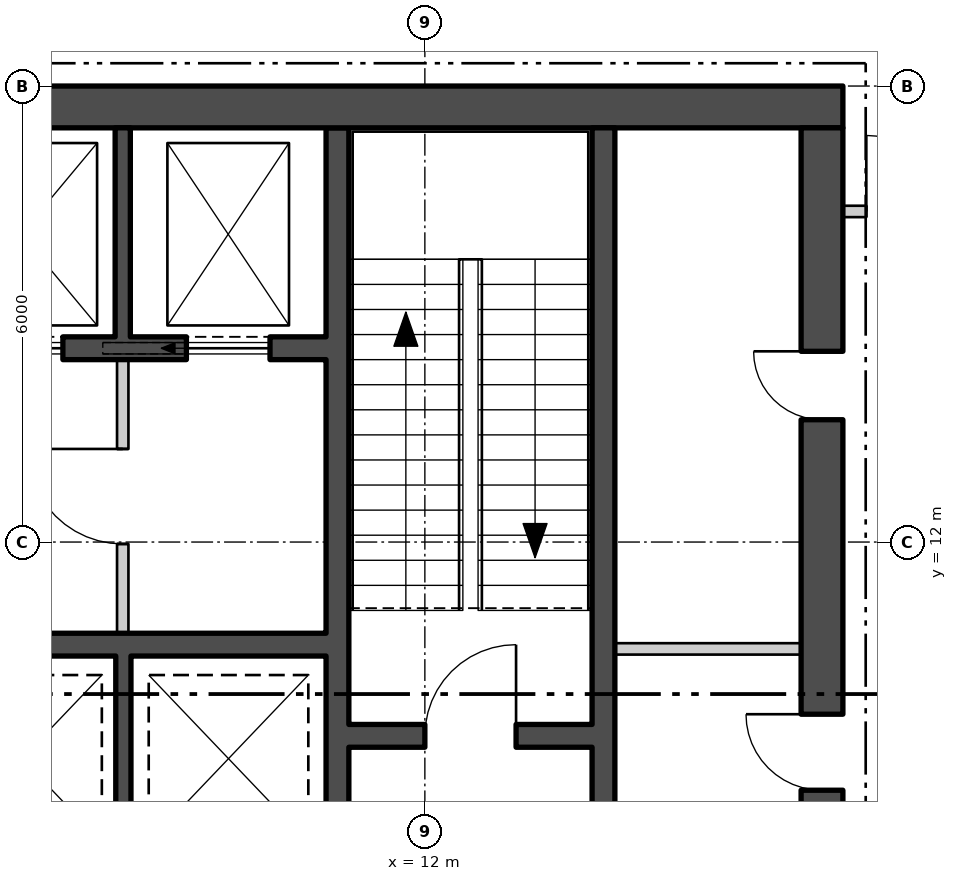
"""IFC4 building model, lengths in metres.
Left out: names, types, materials, properties, quantities, classifications, styles, units other than length and angle.
Written with IfcOpenShell. Run it as: python <this file> out.ifc"""

import sys

from ifc_helpers import new_model, si_unit, direction, frame, frame_2d, origin, place, context, subcontext, project, spatial, polyline, rectangle, outline, extrude, element, fill, save


model = new_model("IFC4")
c1 = context("Model", 3, precision=1e-05, world=origin(), true_north=direction((0.0, 1.0)))
c2 = subcontext(c1, "Body", "Model", "MODEL_VIEW")
j1 = project(units=[si_unit("LENGTHUNIT", "METRE"), si_unit("PLANEANGLEUNIT", "RADIAN")], contexts=[c1])
p1 = place(None, origin())
s1 = spatial("IfcSite", under=j1, at=p1, CompositionType="ELEMENT")
p2 = place(p1, origin())
s2 = spatial("IfcBuilding", under=s1, at=p2, CompositionType="ELEMENT")
p3 = place(p2, frame((0.0, 0.0, 84.3)))
s3 = spatial("IfcBuildingStorey", under=s2, at=p3, CompositionType="ELEMENT", Elevation=84.3)
p4 = place(p3, frame((5.085, -28.436, -0.18), z_axis=(0.0, 0.0, 1.0), x_axis=(0.499999194392, 0.866025868902, 0.0)))
e1 = element("IfcWall", 1, at=p4, inside=s3, PredefinedType="SOLIDWALL", context=c2, shape_type="SweptSolid", body=[
    extrude(outline(polyline([(-0.13, -0.225), (45.86, -0.225), (45.6, 0.225), (0.13, 0.225), (-0.13, -0.225)])), origin(), (0.0, 0.0, 1.0), 4.28),
])
p5 = place(p4, frame((1.424, 0.0, 1.08)))
e2 = element("IfcOpeningElement", 2, at=p5, cuts=e1, PredefinedType="OPENING", context=c2, shape_type="SweptSolid", body=[
    extrude(rectangle(XDim=2.4, YDim=2.6, at=frame_2d((1.2, 1.3))), frame((0.0, 0.235, 0.0), z_axis=(0.0, -1.0, 0.0), x_axis=(1.0, 0.0, 0.0)), (0.0, 0.0, 1.0), 0.47),
])
p6 = place(p4, frame((5.892, 0.0, 1.08)))
e3 = element("IfcOpeningElement", 3, at=p6, cuts=e1, PredefinedType="OPENING", context=c2, shape_type="SweptSolid", body=[
    extrude(rectangle(XDim=2.4, YDim=2.6, at=frame_2d((1.2, 1.3))), frame((0.0, 0.235, 0.0), z_axis=(0.0, -1.0, 0.0), x_axis=(1.0, 0.0, 0.0)), (0.0, 0.0, 1.0), 0.47),
])
p7 = place(p4, frame((10.399, 0.0, 1.08)))
e4 = element("IfcOpeningElement", 4, at=p7, cuts=e1, PredefinedType="OPENING", context=c2, shape_type="SweptSolid", body=[
    extrude(rectangle(XDim=2.4, YDim=2.6, at=frame_2d((1.2, 1.3))), frame((0.0, 0.235, 0.0), z_axis=(0.0, -1.0, 0.0), x_axis=(1.0, 0.0, 0.0)), (0.0, 0.0, 1.0), 0.47),
])
p8 = place(p4, frame((14.905, 0.0, 1.08)))
e5 = element("IfcOpeningElement", 5, at=p8, cuts=e1, PredefinedType="OPENING", context=c2, shape_type="SweptSolid", body=[
    extrude(rectangle(XDim=2.4, YDim=2.6, at=frame_2d((1.2, 1.3))), frame((0.0, 0.235, 0.0), z_axis=(0.0, -1.0, 0.0), x_axis=(1.0, 0.0, 0.0)), (0.0, 0.0, 1.0), 0.47),
])
p9 = place(p4, frame((19.412, 0.0, 1.08)))
e6 = element("IfcOpeningElement", 6, at=p9, cuts=e1, PredefinedType="OPENING", context=c2, shape_type="SweptSolid", body=[
    extrude(rectangle(XDim=2.4, YDim=2.6, at=frame_2d((1.2, 1.3))), frame((0.0, 0.235, 0.0), z_axis=(0.0, -1.0, 0.0), x_axis=(1.0, 0.0, 0.0)), (0.0, 0.0, 1.0), 0.47),
])
p10 = place(p4, frame((23.918, 0.0, 1.08)))
e7 = element("IfcOpeningElement", 7, at=p10, cuts=e1, PredefinedType="OPENING", context=c2, shape_type="SweptSolid", body=[
    extrude(rectangle(XDim=2.4, YDim=2.6, at=frame_2d((1.2, 1.3))), frame((0.0, 0.235, 0.0), z_axis=(0.0, -1.0, 0.0), x_axis=(1.0, 0.0, 0.0)), (0.0, 0.0, 1.0), 0.47),
])
p11 = place(p4, frame((28.425, 0.0, 1.08)))
e8 = element("IfcOpeningElement", 8, at=p11, cuts=e1, PredefinedType="OPENING", context=c2, shape_type="SweptSolid", body=[
    extrude(rectangle(XDim=2.4, YDim=2.6, at=frame_2d((1.2, 1.3))), frame((0.0, 0.235, 0.0), z_axis=(0.0, -1.0, 0.0), x_axis=(1.0, 0.0, 0.0)), (0.0, 0.0, 1.0), 0.47),
])
p12 = place(p4, frame((32.932, 0.0, 1.08)))
e9 = element("IfcOpeningElement", 9, at=p12, cuts=e1, PredefinedType="OPENING", context=c2, shape_type="SweptSolid", body=[
    extrude(rectangle(XDim=2.4, YDim=2.6, at=frame_2d((1.2, 1.3))), frame((0.0, 0.235, 0.0), z_axis=(0.0, -1.0, 0.0), x_axis=(1.0, 0.0, 0.0)), (0.0, 0.0, 1.0), 0.47),
])
p13 = place(p4, frame((37.438, 0.0, 1.08)))
e10 = element("IfcOpeningElement", 10, at=p13, cuts=e1, PredefinedType="OPENING", context=c2, shape_type="SweptSolid", body=[
    extrude(rectangle(XDim=2.4, YDim=2.6, at=frame_2d((1.2, 1.3))), frame((0.0, 0.235, 0.0), z_axis=(0.0, -1.0, 0.0), x_axis=(1.0, 0.0, 0.0)), (0.0, 0.0, 1.0), 0.47),
])
p14 = place(p4, frame((41.907, 0.0, 1.08)))
e11 = element("IfcOpeningElement", 11, at=p14, cuts=e1, PredefinedType="OPENING", context=c2, shape_type="SweptSolid", body=[
    extrude(rectangle(XDim=2.4, YDim=2.6, at=frame_2d((1.2, 1.3))), frame((0.0, 0.235, 0.0), z_axis=(0.0, -1.0, 0.0), x_axis=(1.0, 0.0, 0.0)), (0.0, 0.0, 1.0), 0.47),
])
p15 = place(p3, frame((-17.5, 17.725, 0.0), z_axis=(0.0, 0.0, 1.0), x_axis=(1.0, 0.0, 0.0)))
e12 = element("IfcWall", 12, at=p15, inside=s3, PredefinedType="SHEAR", context=c2, shape_type="SweptSolid", body=[
    extrude(rectangle(XDim=35.0, YDim=0.55, at=frame_2d((17.5, 0.0))), origin(), (0.0, 0.0, 1.0), 4.3),
])
p16 = place(p3, frame((17.225, 0.55, 0.0), z_axis=(0.0, 0.0, 1.0), x_axis=(0.0, 1.0, 0.0)))
e13 = element("IfcWall", 13, at=p16, inside=s3, PredefinedType="SHEAR", context=c2, shape_type="SweptSolid", body=[
    extrude(rectangle(XDim=16.9, YDim=0.55, at=frame_2d((8.45, 0.0))), origin(), (0.0, 0.0, 1.0), 4.3),
])
p17 = place(p16, frame((5.75, 0.0, 0.0)))
e14 = element("IfcOpeningElement", 14, at=p17, cuts=e13, PredefinedType="OPENING", context=c2, shape_type="SweptSolid", body=[
    extrude(rectangle(XDim=1.5, YDim=2.1, at=frame_2d((0.75, 1.05))), frame((0.0, 0.285, 0.0), z_axis=(0.0, -1.0, 0.0), x_axis=(1.0, 0.0, 0.0)), (0.0, 0.0, 1.0), 0.57),
])
p18 = place(p16, frame((1.525, 0.0, 0.0)))
e15 = element("IfcOpeningElement", 15, at=p18, cuts=e13, PredefinedType="OPENING", context=c2, shape_type="SweptSolid", body=[
    extrude(rectangle(XDim=0.9, YDim=2.1, at=frame_2d((0.45, 1.05))), frame((0.0, 0.285, 0.0), z_axis=(0.0, -1.0, 0.0), x_axis=(1.0, 0.0, 0.0)), (0.0, 0.0, 1.0), 0.57),
])
p19 = place(p16, frame((4.4, 0.0, 0.0)))
e16 = element("IfcOpeningElement", 16, at=p19, cuts=e13, PredefinedType="OPENING", context=c2, shape_type="SweptSolid", body=[
    extrude(rectangle(XDim=0.9, YDim=2.1, at=frame_2d((0.45, 1.05))), frame((0.0, 0.285, 0.0), z_axis=(0.0, -1.0, 0.0), x_axis=(1.0, 0.0, 0.0)), (0.0, 0.0, 1.0), 0.57),
])
p20 = place(p16, frame((8.184, 0.0, 0.0)))
e17 = element("IfcOpeningElement", 17, at=p20, cuts=e13, PredefinedType="OPENING", context=c2, shape_type="SweptSolid", body=[
    extrude(rectangle(XDim=1.0, YDim=2.1, at=frame_2d((0.5, 1.05))), frame((0.0, 0.285, 0.0), z_axis=(0.0, -1.0, 0.0), x_axis=(1.0, 0.0, 0.0)), (0.0, 0.0, 1.0), 0.57),
])
p21 = place(p16, frame((13.059, 0.0, 0.0)))
e18 = element("IfcOpeningElement", 18, at=p21, cuts=e13, PredefinedType="OPENING", context=c2, shape_type="SweptSolid", body=[
    extrude(rectangle(XDim=0.9, YDim=2.1, at=frame_2d((0.45, 1.05))), frame((0.0, 0.285, 0.0), z_axis=(0.0, -1.0, 0.0), x_axis=(1.0, 0.0, 0.0)), (0.0, 0.0, 1.0), 0.57),
])
p22 = place(p3, frame((10.85, 0.55, 0.0), z_axis=(0.0, 0.0, 1.0), x_axis=(0.0, 1.0, 0.0)))
e19 = element("IfcWall", 19, at=p22, inside=s3, PredefinedType="SHEAR", context=c2, shape_type="SweptSolid", body=[
    extrude(rectangle(XDim=16.9, YDim=0.3, at=frame_2d((8.45, 0.0))), origin(), (0.0, 0.0, 1.0), 4.3),
])
p23 = place(p22, frame((5.125, 0.0, 0.0)))
e20 = element("IfcOpeningElement", 20, at=p23, cuts=e19, PredefinedType="OPENING", context=c2, shape_type="SweptSolid", body=[
    extrude(rectangle(XDim=1.25, YDim=2.1, at=frame_2d((0.625, 1.05))), frame((0.0, 0.16, 0.0), z_axis=(0.0, -1.0, 0.0), x_axis=(1.0, 0.0, 0.0)), (0.0, 0.0, 1.0), 0.32),
])
p24 = place(p22, frame((1.55, 0.0, 0.0)))
e21 = element("IfcOpeningElement", 21, at=p24, cuts=e19, PredefinedType="OPENING", context=c2, shape_type="SweptSolid", body=[
    extrude(rectangle(XDim=1.0, YDim=2.1, at=frame_2d((0.5, 1.05))), frame((0.0, 0.16, 0.0), z_axis=(0.0, -1.0, 0.0), x_axis=(1.0, 0.0, 0.0)), (0.0, 0.0, 1.0), 0.32),
])
p25 = place(p3, frame((14.35, 0.55, 0.0), z_axis=(0.0, 0.0, 1.0), x_axis=(0.0, 1.0, 0.0)))
e22 = element("IfcWall", 22, at=p25, inside=s3, PredefinedType="SHEAR", context=c2, shape_type="SweptSolid", body=[
    extrude(rectangle(XDim=16.9, YDim=0.3, at=frame_2d((8.45, 0.0))), origin(), (0.0, 0.0, 1.0), 4.3),
])
p26 = place(p25, frame((5.75, 0.0, 0.0)))
e23 = element("IfcOpeningElement", 23, at=p26, cuts=e22, PredefinedType="OPENING", context=c2, shape_type="SweptSolid", body=[
    extrude(rectangle(XDim=1.5, YDim=2.1, at=frame_2d((0.75, 1.05))), frame((0.0, 0.16, 0.0), z_axis=(0.0, -1.0, 0.0), x_axis=(1.0, 0.0, 0.0)), (0.0, 0.0, 1.0), 0.32),
])
p27 = place(p3, frame((11.0, 9.45, 0.0), z_axis=(0.0, 0.0, 1.0), x_axis=(1.0, 0.0, 0.0)))
e24 = element("IfcWall", 24, at=p27, inside=s3, PredefinedType="SHEAR", context=c2, shape_type="SweptSolid", body=[
    extrude(rectangle(XDim=3.2, YDim=0.3, at=frame_2d((1.6, 0.0))), origin(), (0.0, 0.0, 1.0), 4.3),
])
p28 = place(p27, frame((1.0, 0.0, 0.0)))
e25 = element("IfcOpeningElement", 25, at=p28, cuts=e24, PredefinedType="OPENING", context=c2, shape_type="SweptSolid", body=[
    extrude(rectangle(XDim=1.2, YDim=2.1, at=frame_2d((0.6, 1.05))), frame((0.0, 0.16, 0.0), z_axis=(0.0, -1.0, 0.0), x_axis=(1.0, 0.0, 0.0)), (0.0, 0.0, 1.0), 0.32),
])
p29 = place(p3, frame((-10.7, 14.55, 0.0), z_axis=(0.0, 0.0, 1.0), x_axis=(1.0, 0.0, 0.0)))
e26 = element("IfcWall", 26, at=p29, inside=s3, PredefinedType="SHEAR", context=c2, shape_type="SweptSolid", body=[
    extrude(rectangle(XDim=21.4, YDim=0.3, at=frame_2d((10.7, 0.0))), origin(), (0.0, 0.0, 1.0), 4.3),
])
p30 = place(p29, frame((0.738, 0.0, 0.0)))
e27 = element("IfcOpeningElement", 27, at=p30, cuts=e26, PredefinedType="OPENING", context=c2, shape_type="SweptSolid", body=[
    extrude(rectangle(XDim=1.1, YDim=2.1, at=frame_2d((0.55, 1.05))), frame((0.0, 0.16, 0.0), z_axis=(0.0, -1.0, 0.0), x_axis=(1.0, 0.0, 0.0)), (0.0, 0.0, 1.0), 0.32),
])
p31 = place(p29, frame((3.462, 0.0, 0.0)))
e28 = element("IfcOpeningElement", 28, at=p31, cuts=e26, PredefinedType="OPENING", context=c2, shape_type="SweptSolid", body=[
    extrude(rectangle(XDim=1.1, YDim=2.1, at=frame_2d((0.55, 1.05))), frame((0.0, 0.16, 0.0), z_axis=(0.0, -1.0, 0.0), x_axis=(1.0, 0.0, 0.0)), (0.0, 0.0, 1.0), 0.32),
])
p32 = place(p29, frame((6.138, 0.0, 0.0)))
e29 = element("IfcOpeningElement", 29, at=p32, cuts=e26, PredefinedType="OPENING", context=c2, shape_type="SweptSolid", body=[
    extrude(rectangle(XDim=1.1, YDim=2.1, at=frame_2d((0.55, 1.05))), frame((0.0, 0.16, 0.0), z_axis=(0.0, -1.0, 0.0), x_axis=(1.0, 0.0, 0.0)), (0.0, 0.0, 1.0), 0.32),
])
p33 = place(p29, frame((8.812, 0.0, 0.0)))
e30 = element("IfcOpeningElement", 30, at=p33, cuts=e26, PredefinedType="OPENING", context=c2, shape_type="SweptSolid", body=[
    extrude(rectangle(XDim=1.1, YDim=2.1, at=frame_2d((0.55, 1.05))), frame((0.0, 0.16, 0.0), z_axis=(0.0, -1.0, 0.0), x_axis=(1.0, 0.0, 0.0)), (0.0, 0.0, 1.0), 0.32),
])
p34 = place(p29, frame((14.162, 0.0, 0.0)))
e31 = element("IfcOpeningElement", 31, at=p34, cuts=e26, PredefinedType="OPENING", context=c2, shape_type="SweptSolid", body=[
    extrude(rectangle(XDim=1.1, YDim=2.1, at=frame_2d((0.55, 1.05))), frame((0.0, 0.16, 0.0), z_axis=(0.0, -1.0, 0.0), x_axis=(1.0, 0.0, 0.0)), (0.0, 0.0, 1.0), 0.32),
])
p35 = place(p29, frame((16.837, 0.0, 0.0)))
e32 = element("IfcOpeningElement", 32, at=p35, cuts=e26, PredefinedType="OPENING", context=c2, shape_type="SweptSolid", body=[
    extrude(rectangle(XDim=1.1, YDim=2.1, at=frame_2d((0.55, 1.05))), frame((0.0, 0.16, 0.0), z_axis=(0.0, -1.0, 0.0), x_axis=(1.0, 0.0, 0.0)), (0.0, 0.0, 1.0), 0.32),
])
p36 = place(p29, frame((19.562, 0.0, 0.0)))
e33 = element("IfcOpeningElement", 33, at=p36, cuts=e26, PredefinedType="OPENING", context=c2, shape_type="SweptSolid", body=[
    extrude(rectangle(XDim=1.1, YDim=2.1, at=frame_2d((0.55, 1.05))), frame((0.0, 0.16, 0.0), z_axis=(0.0, -1.0, 0.0), x_axis=(1.0, 0.0, 0.0)), (0.0, 0.0, 1.0), 0.32),
])
p37 = place(p3, frame((2.6, 10.65, 0.0), z_axis=(0.0, 0.0, 1.0), x_axis=(1.0, 0.0, 0.0)))
e34 = element("IfcWall", 34, at=p37, inside=s3, PredefinedType="SHEAR", context=c2, shape_type="SweptSolid", body=[
    extrude(rectangle(XDim=8.1, YDim=0.3, at=frame_2d((4.05, 0.0))), origin(), (0.0, 0.0, 1.0), 4.3),
])
p38 = place(p3, frame((8.025, 14.7, 0.0), z_axis=(0.0, 0.0, 1.0), x_axis=(0.0, 1.0, 0.0)))
e35 = element("IfcWall", 35, at=p38, inside=s3, PredefinedType="SHEAR", context=c2, shape_type="SweptSolid", body=[
    extrude(rectangle(XDim=2.75, YDim=0.2, at=frame_2d((1.375, 0.0))), origin(), (0.0, 0.0, 1.0), 4.3),
])
p39 = place(p3, frame((8.033, 7.8, 0.0), z_axis=(0.0, 0.0, 1.0), x_axis=(0.0, 1.0, 0.0)))
e36 = element("IfcWall", 36, at=p39, inside=s3, PredefinedType="SHEAR", context=c2, shape_type="SweptSolid", body=[
    extrude(rectangle(XDim=2.7, YDim=0.2, at=frame_2d((1.35, 0.0))), origin(), (0.0, 0.0, 1.0), 4.3),
])
p40 = place(p3, frame((8.025, 10.8, 0.0), z_axis=(0.0, 0.0, 1.0), x_axis=(0.0, 1.0, 0.0)))
e37 = element("IfcWall", 37, at=p40, inside=s3, PredefinedType="PARTITIONING", context=c2, shape_type="SweptSolid", body=[
    extrude(rectangle(XDim=3.6, YDim=0.15, at=frame_2d((1.8, 0.0))), origin(), (0.0, 0.0, 1.0), 4.3),
])
p41 = place(p40, frame((1.175, 0.0, 0.0)))
e38 = element("IfcOpeningElement", 38, at=p41, cuts=e37, PredefinedType="OPENING", context=c2, shape_type="SweptSolid", body=[
    extrude(rectangle(XDim=1.25, YDim=2.1, at=frame_2d((0.625, 1.05))), frame((0.0, 0.085, 0.0), z_axis=(0.0, -1.0, 0.0), x_axis=(1.0, 0.0, 0.0)), (0.0, 0.0, 1.0), 0.17),
])
p42 = place(p3, frame((14.5, 10.594, 0.0), z_axis=(0.0, 0.0, 1.0), x_axis=(1.0, 0.0, 0.0)))
e39 = element("IfcWall", 39, at=p42, inside=s3, PredefinedType="PARTITIONING", context=c2, shape_type="SweptSolid", body=[
    extrude(rectangle(XDim=2.45, YDim=0.15, at=frame_2d((1.225, 0.0))), origin(), (0.0, 0.0, 1.0), 4.3),
])
p43 = place(p3, frame((17.5, 16.35, 0.0), z_axis=(0.0, 0.0, 1.0), x_axis=(1.0, 0.0, 0.0)))
e40 = element("IfcWall", 40, at=p43, inside=s3, PredefinedType="PARTITIONING", context=c2, shape_type="SweptSolid", body=[
    extrude(rectangle(XDim=1.725, YDim=0.15, at=frame_2d((0.863, 0.0))), origin(), (0.0, 0.0, 1.0), 4.3),
])
p44 = place(p43, frame((0.308, 0.0, 0.0)))
e41 = element("IfcOpeningElement", 41, at=p44, cuts=e40, PredefinedType="OPENING", context=c2, shape_type="SweptSolid", body=[
    extrude(rectangle(XDim=1.0, YDim=2.1, at=frame_2d((0.5, 1.05))), frame((0.0, 0.085, 0.0), z_axis=(0.0, -1.0, 0.0), x_axis=(1.0, 0.0, 0.0)), (0.0, 0.0, 1.0), 0.17),
])
p45 = place(p35, origin())
e42 = element("IfcDoor", 42, at=p45, inside=s3, OperationType="SLIDING_TO_LEFT", PredefinedType="DOOR", context=c2, shape_type="SweptSolid", body=[
    extrude(rectangle(XDim=1.1, YDim=2.1, at=frame_2d((0.55, 1.05))), frame((0.0, 0.025, 0.0), z_axis=(0.0, -1.0, 0.0), x_axis=(1.0, 0.0, 0.0)), (0.0, 0.0, 1.0), 0.05),
])
fill(e32, e42)
p46 = place(p36, origin())
e43 = element("IfcDoor", 43, at=p46, inside=s3, OperationType="SLIDING_TO_LEFT", PredefinedType="DOOR", context=c2, shape_type="SweptSolid", body=[
    extrude(rectangle(XDim=1.1, YDim=2.1, at=frame_2d((0.55, 1.05))), frame((0.0, 0.025, 0.0), z_axis=(0.0, -1.0, 0.0), x_axis=(1.0, 0.0, 0.0)), (0.0, 0.0, 1.0), 0.05),
])
fill(e33, e43)
p47 = place(p41, origin())
e44 = element("IfcDoor", 44, at=p47, inside=s3, OperationType="SINGLE_SWING_LEFT", PredefinedType="DOOR", context=c2, shape_type="SweptSolid", body=[
    extrude(rectangle(XDim=1.25, YDim=2.1, at=frame_2d((0.625, 1.05))), frame((0.0, 0.025, 0.0), z_axis=(0.0, -1.0, 0.0), x_axis=(1.0, 0.0, 0.0)), (0.0, 0.0, 1.0), 0.05),
])
fill(e38, e44)
p48 = place(p28, origin())
e45 = element("IfcDoor", 45, at=p48, inside=s3, OperationType="SINGLE_SWING_LEFT", PredefinedType="DOOR", context=c2, shape_type="SweptSolid", body=[
    extrude(rectangle(XDim=1.2, YDim=2.1, at=frame_2d((0.6, 1.05))), frame((0.0, 0.025, 0.0), z_axis=(0.0, -1.0, 0.0), x_axis=(1.0, 0.0, 0.0)), (0.0, 0.0, 1.0), 0.05),
])
fill(e25, e45)
p49 = place(p20, origin())
e46 = element("IfcDoor", 46, at=p49, inside=s3, OperationType="SINGLE_SWING_LEFT", PredefinedType="DOOR", context=c2, shape_type="SweptSolid", body=[
    extrude(rectangle(XDim=1.0, YDim=2.1, at=frame_2d((0.5, 1.05))), frame((0.0, 0.025, 0.0), z_axis=(0.0, -1.0, 0.0), x_axis=(1.0, 0.0, 0.0)), (0.0, 0.0, 1.0), 0.05),
])
fill(e17, e46)
p50 = place(p21, origin())
e47 = element("IfcDoor", 47, at=p50, inside=s3, OperationType="SINGLE_SWING_LEFT", PredefinedType="DOOR", context=c2, shape_type="SweptSolid", body=[
    extrude(rectangle(XDim=0.9, YDim=2.1, at=frame_2d((0.45, 1.05))), frame((0.0, 0.025, 0.0), z_axis=(0.0, -1.0, 0.0), x_axis=(1.0, 0.0, 0.0)), (0.0, 0.0, 1.0), 0.05),
])
fill(e18, e47)
p51 = place(p44, origin())
e48 = element("IfcDoor", 48, at=p51, inside=s3, OperationType="SINGLE_SWING_RIGHT", PredefinedType="DOOR", context=c2, shape_type="SweptSolid", body=[
    extrude(rectangle(XDim=1.0, YDim=2.1, at=frame_2d((0.5, 1.05))), frame((0.0, 0.025, 0.0), z_axis=(0.0, -1.0, 0.0), x_axis=(1.0, 0.0, 0.0)), (0.0, 0.0, 1.0), 0.05),
])
fill(e41, e48)
save(model, sys.argv[1])
